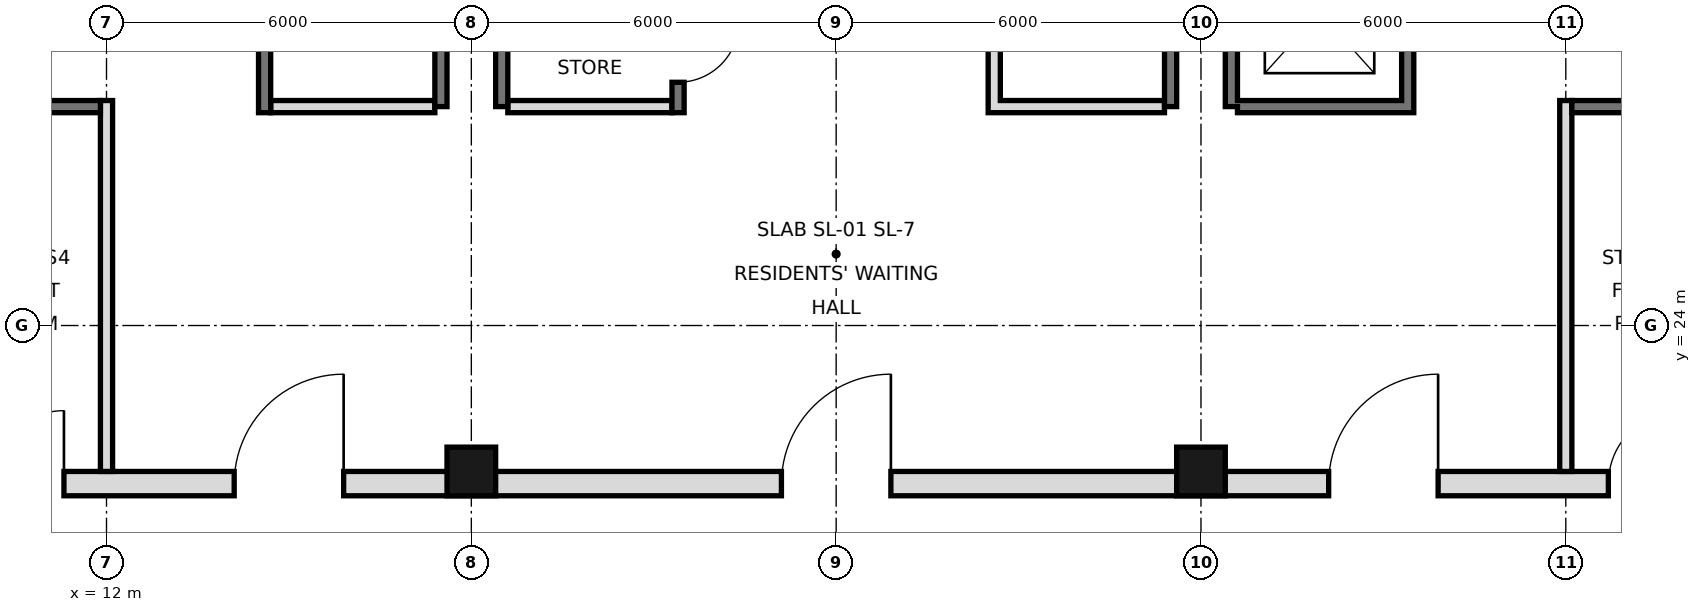
"""IFC4 building model, lengths in metres.
Left out: names, types, materials, properties, quantities, classifications, styles, units other than length and angle.
Written with IfcOpenShell. Run it as: python <this file> out.ifc"""

import sys

from ifc_helpers import new_model, si_unit, direction, frame, frame_2d, origin, origin_2d, place, context, subcontext, project, spatial, rectangle, hollow_rectangle, extrude, element, fill, save


model = new_model("IFC4")
c1 = context("Model", 3, precision=1e-05, world=origin(), true_north=direction((0.0, 1.0)))
c2 = subcontext(c1, "Body", "Model", "MODEL_VIEW")
j1 = project(units=[si_unit("LENGTHUNIT", "METRE"), si_unit("PLANEANGLEUNIT", "RADIAN")], contexts=[c1])
p1 = place(None, origin())
s1 = spatial("IfcSite", under=j1, at=p1, CompositionType="ELEMENT")
p2 = place(p1, origin())
s2 = spatial("IfcBuilding", under=s1, at=p2, CompositionType="ELEMENT")
p3 = place(p2, frame((0.0, 0.0, 219.0)))
s3 = spatial("IfcBuildingStorey", under=s2, at=p3, CompositionType="ELEMENT", Elevation=219.0)
for number, where, z_axis, x_axis in (
    (1, (18.0, 21.6, 0.0), (0.0, 0.0, 1.0), (1.0, 0.0, 0.0)),
    (2, (30.0, 21.6, 0.0), (0.0, 0.0, 1.0), (1.0, 0.0, 0.0)),
):
    element("IfcColumn", number, at=place(p3, frame(where, z_axis=z_axis, x_axis=x_axis)), inside=s3, PredefinedType="COLUMN", context=c2, shape_type="SweptSolid", body=[
        extrude(hollow_rectangle(XDim=0.8, YDim=0.8, WallThickness=0.04, at=origin_2d()), origin(), (0.0, 0.0, 1.0), 3.6),
    ])
for number, where, z_axis, x_axis in (
    (3, (17.5, 27.6, 0.0), (0.0, 0.0, 1.0), (0.0, 1.0, 0.0)),
    (4, (18.5, 27.6, 0.0), (0.0, 0.0, 1.0), (0.0, 1.0, 0.0)),
    (5, (29.5, 27.6, 0.0), (0.0, 0.0, 1.0), (0.0, 1.0, 0.0)),
    (6, (30.5, 27.6, 0.0), (0.0, 0.0, 1.0), (0.0, 1.0, 0.0)),
):
    element("IfcWall", number, at=place(p3, frame(where, z_axis=z_axis, x_axis=x_axis)), inside=s3, PredefinedType="SOLIDWALL", context=c2, shape_type="SweptSolid", body=[
        extrude(rectangle(XDim=17.5, YDim=0.2, at=frame_2d((8.75, 0.0))), origin(), (0.0, 0.0, 1.0), 3.42),
    ])
p4 = place(p3, frame((5.6, 21.4, 0.0), z_axis=(0.0, 0.0, 1.0), x_axis=(1.0, 0.0, 0.0)))
e7 = element("IfcWall", 7, at=p4, inside=s3, PredefinedType="SOLIDWALL", context=c2, shape_type="SweptSolid", body=[
    extrude(rectangle(XDim=36.8, YDim=0.4, at=frame_2d((18.4, 0.0))), origin(), (0.0, 0.0, 1.0), 3.42),
])
p5 = place(p4, frame((8.5, 0.0, 0.0)))
e8 = element("IfcOpeningElement", 8, at=p5, cuts=e7, PredefinedType="OPENING", context=c2, shape_type="SweptSolid", body=[
    extrude(rectangle(XDim=1.8, YDim=2.1, at=frame_2d((0.9, 1.05))), frame((0.0, 0.21, 0.0), z_axis=(0.0, -1.0, 0.0), x_axis=(1.0, 0.0, 0.0)), (0.0, 0.0, 1.0), 0.42),
])
p6 = place(p4, frame((17.5, 0.0, 0.0)))
e9 = element("IfcOpeningElement", 9, at=p6, cuts=e7, PredefinedType="OPENING", context=c2, shape_type="SweptSolid", body=[
    extrude(rectangle(XDim=1.8, YDim=2.1, at=frame_2d((0.9, 1.05))), frame((0.0, 0.21, 0.0), z_axis=(0.0, -1.0, 0.0), x_axis=(1.0, 0.0, 0.0)), (0.0, 0.0, 1.0), 0.42),
])
p7 = place(p4, frame((26.5, 0.0, 0.0)))
e10 = element("IfcOpeningElement", 10, at=p7, cuts=e7, PredefinedType="OPENING", context=c2, shape_type="SweptSolid", body=[
    extrude(rectangle(XDim=1.8, YDim=2.1, at=frame_2d((0.9, 1.05))), frame((0.0, 0.21, 0.0), z_axis=(0.0, -1.0, 0.0), x_axis=(1.0, 0.0, 0.0)), (0.0, 0.0, 1.0), 0.42),
])
p8 = place(p4, frame((4.5, 0.0, 0.0)))
e11 = element("IfcOpeningElement", 11, at=p8, cuts=e7, PredefinedType="OPENING", context=c2, shape_type="SweptSolid", body=[
    extrude(rectangle(XDim=1.2, YDim=2.1, at=frame_2d((0.6, 1.05))), frame((0.0, 0.21, 0.0), z_axis=(0.0, -1.0, 0.0), x_axis=(1.0, 0.0, 0.0)), (0.0, 0.0, 1.0), 0.42),
])
p9 = place(p4, frame((31.1, 0.0, 0.0)))
e12 = element("IfcOpeningElement", 12, at=p9, cuts=e7, PredefinedType="OPENING", context=c2, shape_type="SweptSolid", body=[
    extrude(rectangle(XDim=1.2, YDim=2.1, at=frame_2d((0.6, 1.05))), frame((0.0, 0.21, 0.0), z_axis=(0.0, -1.0, 0.0), x_axis=(1.0, 0.0, 0.0)), (0.0, 0.0, 1.0), 0.42),
])
p10 = place(p3, frame((12.0, 21.6, 0.0), z_axis=(0.0, 0.0, 1.0), x_axis=(0.0, 1.0, 0.0)))
e13 = element("IfcWall", 13, at=p10, inside=s3, PredefinedType="PARTITIONING", context=c2, shape_type="SweptSolid", body=[
    extrude(rectangle(XDim=6.1, YDim=0.2, at=frame_2d((3.05, 0.0))), origin(), (0.0, 0.0, 1.0), 3.42),
])
p11 = place(p3, frame((14.6, 27.5, 0.0), z_axis=(0.0, 0.0, 1.0), x_axis=(0.0, 1.0, 0.0)))
e14 = element("IfcWall", 14, at=p11, inside=s3, PredefinedType="SOLIDWALL", context=c2, shape_type="SweptSolid", body=[
    extrude(rectangle(XDim=17.5, YDim=0.2, at=frame_2d((8.75, 0.0))), origin(), (0.0, 0.0, 1.0), 3.42),
])
p12 = place(p11, frame((15.4, 0.0, 0.0)))
e15 = element("IfcOpeningElement", 15, at=p12, cuts=e14, PredefinedType="OPENING", context=c2, shape_type="SweptSolid", body=[
    extrude(rectangle(XDim=1.1, YDim=2.1, at=frame_2d((0.55, 1.05))), frame((0.0, 0.11, 0.0), z_axis=(0.0, -1.0, 0.0), x_axis=(1.0, 0.0, 0.0)), (0.0, 0.0, 1.0), 0.22),
])
p13 = place(p11, frame((2.7, 0.0, 0.0)))
e16 = element("IfcOpeningElement", 16, at=p13, cuts=e14, PredefinedType="OPENING", context=c2, shape_type="SweptSolid", body=[
    extrude(rectangle(XDim=1.0, YDim=2.1, at=frame_2d((0.5, 1.05))), frame((0.0, 0.11, 0.0), z_axis=(0.0, -1.0, 0.0), x_axis=(1.0, 0.0, 0.0)), (0.0, 0.0, 1.0), 0.22),
])
p14 = place(p11, frame((9.9, 0.0, 0.0)))
e17 = element("IfcOpeningElement", 17, at=p14, cuts=e14, PredefinedType="OPENING", context=c2, shape_type="SweptSolid", body=[
    extrude(rectangle(XDim=0.9, YDim=2.1, at=frame_2d((0.45, 1.05))), frame((0.0, 0.11, 0.0), z_axis=(0.0, -1.0, 0.0), x_axis=(1.0, 0.0, 0.0)), (0.0, 0.0, 1.0), 0.22),
])
p15 = place(p3, frame((21.4, 27.5, 0.0), z_axis=(0.0, 0.0, 1.0), x_axis=(0.0, 1.0, 0.0)))
e18 = element("IfcWall", 18, at=p15, inside=s3, PredefinedType="SOLIDWALL", context=c2, shape_type="SweptSolid", body=[
    extrude(rectangle(XDim=17.5, YDim=0.2, at=frame_2d((8.75, 0.0))), origin(), (0.0, 0.0, 1.0), 3.42),
])
p16 = place(p15, frame((0.5, 0.0, 0.0)))
e19 = element("IfcOpeningElement", 19, at=p16, cuts=e18, PredefinedType="OPENING", context=c2, shape_type="SweptSolid", body=[
    extrude(rectangle(XDim=1.0, YDim=2.1, at=frame_2d((0.5, 1.05))), frame((0.0, 0.11, 0.0), z_axis=(0.0, -1.0, 0.0), x_axis=(1.0, 0.0, 0.0)), (0.0, 0.0, 1.0), 0.22),
])
p17 = place(p15, frame((3.6, 0.0, 0.0)))
e20 = element("IfcOpeningElement", 20, at=p17, cuts=e18, PredefinedType="OPENING", context=c2, shape_type="SweptSolid", body=[
    extrude(rectangle(XDim=1.0, YDim=2.1, at=frame_2d((0.5, 1.05))), frame((0.0, 0.11, 0.0), z_axis=(0.0, -1.0, 0.0), x_axis=(1.0, 0.0, 0.0)), (0.0, 0.0, 1.0), 0.22),
])
p18 = place(p15, frame((16.2, 0.0, 0.0)))
e21 = element("IfcOpeningElement", 21, at=p18, cuts=e18, PredefinedType="OPENING", context=c2, shape_type="SweptSolid", body=[
    extrude(rectangle(XDim=1.0, YDim=2.1, at=frame_2d((0.5, 1.05))), frame((0.0, 0.11, 0.0), z_axis=(0.0, -1.0, 0.0), x_axis=(1.0, 0.0, 0.0)), (0.0, 0.0, 1.0), 0.22),
])
p19 = place(p15, frame((7.4, 0.0, 0.0)))
e22 = element("IfcOpeningElement", 22, at=p19, cuts=e18, PredefinedType="OPENING", context=c2, shape_type="SweptSolid", body=[
    extrude(rectangle(XDim=0.9, YDim=2.1, at=frame_2d((0.45, 1.05))), frame((0.0, 0.11, 0.0), z_axis=(0.0, -1.0, 0.0), x_axis=(1.0, 0.0, 0.0)), (0.0, 0.0, 1.0), 0.22),
])
p20 = place(p3, frame((26.6, 27.5, 0.0), z_axis=(0.0, 0.0, 1.0), x_axis=(0.0, 1.0, 0.0)))
e23 = element("IfcWall", 23, at=p20, inside=s3, PredefinedType="SOLIDWALL", context=c2, shape_type="SweptSolid", body=[
    extrude(rectangle(XDim=17.5, YDim=0.2, at=frame_2d((8.75, 0.0))), origin(), (0.0, 0.0, 1.0), 3.42),
])
p21 = place(p20, frame((4.3, 0.0, 0.0)))
e24 = element("IfcOpeningElement", 24, at=p21, cuts=e23, PredefinedType="OPENING", context=c2, shape_type="SweptSolid", body=[
    extrude(rectangle(XDim=0.9, YDim=2.1, at=frame_2d((0.45, 1.05))), frame((0.0, 0.11, 0.0), z_axis=(0.0, -1.0, 0.0), x_axis=(1.0, 0.0, 0.0)), (0.0, 0.0, 1.0), 0.22),
])
p22 = place(p20, frame((10.35, 0.0, 0.0)))
e25 = element("IfcOpeningElement", 25, at=p22, cuts=e23, PredefinedType="OPENING", context=c2, shape_type="SweptSolid", body=[
    extrude(rectangle(XDim=1.0, YDim=2.1, at=frame_2d((0.5, 1.05))), frame((0.0, 0.11, 0.0), z_axis=(0.0, -1.0, 0.0), x_axis=(1.0, 0.0, 0.0)), (0.0, 0.0, 1.0), 0.22),
])
p23 = place(p20, frame((14.575, 0.0, 0.0)))
e26 = element("IfcOpeningElement", 26, at=p23, cuts=e23, PredefinedType="OPENING", context=c2, shape_type="SweptSolid", body=[
    extrude(rectangle(XDim=1.0, YDim=2.1, at=frame_2d((0.5, 1.05))), frame((0.0, 0.11, 0.0), z_axis=(0.0, -1.0, 0.0), x_axis=(1.0, 0.0, 0.0)), (0.0, 0.0, 1.0), 0.22),
])
p24 = place(p3, frame((33.4, 27.5, 0.0), z_axis=(0.0, 0.0, 1.0), x_axis=(0.0, 1.0, 0.0)))
e27 = element("IfcWall", 27, at=p24, inside=s3, PredefinedType="SOLIDWALL", context=c2, shape_type="SweptSolid", body=[
    extrude(rectangle(XDim=17.5, YDim=0.2, at=frame_2d((8.75, 0.0))), origin(), (0.0, 0.0, 1.0), 3.42),
])
p25 = place(p24, frame((1.1, 0.0, 0.0)))
e28 = element("IfcOpeningElement", 28, at=p25, cuts=e27, PredefinedType="OPENING", context=c2, shape_type="SweptSolid", body=[
    extrude(rectangle(XDim=1.1, YDim=2.1, at=frame_2d((0.55, 1.05))), frame((0.0, 0.11, 0.0), z_axis=(0.0, -1.0, 0.0), x_axis=(1.0, 0.0, 0.0)), (0.0, 0.0, 1.0), 0.22),
])
p26 = place(p24, frame((4.2, 0.0, 0.0)))
e29 = element("IfcOpeningElement", 29, at=p26, cuts=e27, PredefinedType="OPENING", context=c2, shape_type="SweptSolid", body=[
    extrude(rectangle(XDim=1.1, YDim=2.1, at=frame_2d((0.55, 1.05))), frame((0.0, 0.11, 0.0), z_axis=(0.0, -1.0, 0.0), x_axis=(1.0, 0.0, 0.0)), (0.0, 0.0, 1.0), 0.22),
])
p27 = place(p24, frame((15.4, 0.0, 0.0)))
e30 = element("IfcOpeningElement", 30, at=p27, cuts=e27, PredefinedType="OPENING", context=c2, shape_type="SweptSolid", body=[
    extrude(rectangle(XDim=1.1, YDim=2.1, at=frame_2d((0.55, 1.05))), frame((0.0, 0.11, 0.0), z_axis=(0.0, -1.0, 0.0), x_axis=(1.0, 0.0, 0.0)), (0.0, 0.0, 1.0), 0.22),
])
p28 = place(p24, frame((9.9, 0.0, 0.0)))
e31 = element("IfcOpeningElement", 31, at=p28, cuts=e27, PredefinedType="OPENING", context=c2, shape_type="SweptSolid", body=[
    extrude(rectangle(XDim=0.9, YDim=2.1, at=frame_2d((0.45, 1.05))), frame((0.0, 0.11, 0.0), z_axis=(0.0, -1.0, 0.0), x_axis=(1.0, 0.0, 0.0)), (0.0, 0.0, 1.0), 0.22),
])
p29 = place(p3, frame((36.0, 21.6, 0.0), z_axis=(0.0, 0.0, 1.0), x_axis=(0.0, 1.0, 0.0)))
e32 = element("IfcWall", 32, at=p29, inside=s3, PredefinedType="PARTITIONING", context=c2, shape_type="SweptSolid", body=[
    extrude(rectangle(XDim=6.1, YDim=0.2, at=frame_2d((3.05, 0.0))), origin(), (0.0, 0.0, 1.0), 3.42),
])
for number, where, z_axis, x_axis in (
    (33, (14.7, 27.6, 0.0), (0.0, 0.0, 1.0), (1.0, 0.0, 0.0)),
    (34, (18.6, 27.6, 0.0), (0.0, 0.0, 1.0), (1.0, 0.0, 0.0)),
):
    element("IfcWall", number, at=place(p3, frame(where, z_axis=z_axis, x_axis=x_axis)), inside=s3, PredefinedType="PARTITIONING", context=c2, shape_type="SweptSolid", body=[
        extrude(rectangle(XDim=2.7, YDim=0.2, at=frame_2d((1.35, 0.0))), origin(), (0.0, 0.0, 1.0), 3.42),
    ])
for number, where, z_axis, x_axis in (
    (35, (26.7, 27.6, 0.0), (0.0, 0.0, 1.0), (1.0, 0.0, 0.0)),
    (36, (30.6, 27.6, 0.0), (0.0, 0.0, 1.0), (1.0, 0.0, 0.0)),
):
    element("IfcWall", number, at=place(p3, frame(where, z_axis=z_axis, x_axis=x_axis)), inside=s3, PredefinedType="SOLIDWALL", context=c2, shape_type="SweptSolid", body=[
        extrude(rectangle(XDim=2.7, YDim=0.2, at=frame_2d((1.35, 0.0))), origin(), (0.0, 0.0, 1.0), 3.42),
    ])
for number, where, z_axis, x_axis in (
    (37, (36.1, 27.6, 0.0), (0.0, 0.0, 1.0), (1.0, 0.0, 0.0)),
    (38, (6.6, 27.6, 0.0), (0.0, 0.0, 1.0), (1.0, 0.0, 0.0)),
):
    element("IfcWall", number, at=place(p3, frame(where, z_axis=z_axis, x_axis=x_axis)), inside=s3, PredefinedType="SOLIDWALL", context=c2, shape_type="SweptSolid", body=[
        extrude(rectangle(XDim=5.3, YDim=0.2, at=frame_2d((2.65, 0.0))), origin(), (0.0, 0.0, 1.0), 3.42),
    ])
p30 = place(p5, frame((1.8, 0.0, 0.0), z_axis=(0.0, 0.0, 1.0), x_axis=(-1.0, 0.0, 0.0)))
e39 = element("IfcDoor", 39, at=p30, inside=s3, OperationType="SINGLE_SWING_LEFT", PredefinedType="DOOR", context=c2, shape_type="SweptSolid", body=[
    extrude(rectangle(XDim=1.8, YDim=2.1, at=frame_2d((0.9, 1.05))), frame((0.0, 0.025, 0.0), z_axis=(0.0, -1.0, 0.0), x_axis=(1.0, 0.0, 0.0)), (0.0, 0.0, 1.0), 0.05),
])
fill(e8, e39)
p31 = place(p6, frame((1.8, 0.0, 0.0), z_axis=(0.0, 0.0, 1.0), x_axis=(-1.0, 0.0, 0.0)))
e40 = element("IfcDoor", 40, at=p31, inside=s3, OperationType="SINGLE_SWING_LEFT", PredefinedType="DOOR", context=c2, shape_type="SweptSolid", body=[
    extrude(rectangle(XDim=1.8, YDim=2.1, at=frame_2d((0.9, 1.05))), frame((0.0, 0.025, 0.0), z_axis=(0.0, -1.0, 0.0), x_axis=(1.0, 0.0, 0.0)), (0.0, 0.0, 1.0), 0.05),
])
fill(e9, e40)
p32 = place(p7, frame((1.8, 0.0, 0.0), z_axis=(0.0, 0.0, 1.0), x_axis=(-1.0, 0.0, 0.0)))
e41 = element("IfcDoor", 41, at=p32, inside=s3, OperationType="SINGLE_SWING_LEFT", PredefinedType="DOOR", context=c2, shape_type="SweptSolid", body=[
    extrude(rectangle(XDim=1.8, YDim=2.1, at=frame_2d((0.9, 1.05))), frame((0.0, 0.025, 0.0), z_axis=(0.0, -1.0, 0.0), x_axis=(1.0, 0.0, 0.0)), (0.0, 0.0, 1.0), 0.05),
])
fill(e10, e41)
p33 = place(p8, frame((1.2, 0.0, 0.0), z_axis=(0.0, 0.0, 1.0), x_axis=(-1.0, 0.0, 0.0)))
e42 = element("IfcDoor", 42, at=p33, inside=s3, OperationType="SINGLE_SWING_LEFT", PredefinedType="DOOR", context=c2, shape_type="SweptSolid", body=[
    extrude(rectangle(XDim=1.2, YDim=2.1, at=frame_2d((0.6, 1.05))), frame((0.0, 0.025, 0.0), z_axis=(0.0, -1.0, 0.0), x_axis=(1.0, 0.0, 0.0)), (0.0, 0.0, 1.0), 0.05),
])
fill(e11, e42)
p34 = place(p9, frame((1.2, 0.0, 0.0), z_axis=(0.0, 0.0, 1.0), x_axis=(-1.0, 0.0, 0.0)))
e43 = element("IfcDoor", 43, at=p34, inside=s3, OperationType="SINGLE_SWING_LEFT", PredefinedType="DOOR", context=c2, shape_type="SweptSolid", body=[
    extrude(rectangle(XDim=1.2, YDim=2.1, at=frame_2d((0.6, 1.05))), frame((0.0, 0.025, 0.0), z_axis=(0.0, -1.0, 0.0), x_axis=(1.0, 0.0, 0.0)), (0.0, 0.0, 1.0), 0.05),
])
fill(e12, e43)
p35 = place(p16, origin())
e44 = element("IfcDoor", 44, at=p35, inside=s3, OperationType="SINGLE_SWING_RIGHT", PredefinedType="DOOR", context=c2, shape_type="SweptSolid", body=[
    extrude(rectangle(XDim=1.0, YDim=2.1, at=frame_2d((0.5, 1.05))), frame((0.0, 0.025, 0.0), z_axis=(0.0, -1.0, 0.0), x_axis=(1.0, 0.0, 0.0)), (0.0, 0.0, 1.0), 0.05),
])
fill(e19, e44)
save(model, sys.argv[1])
